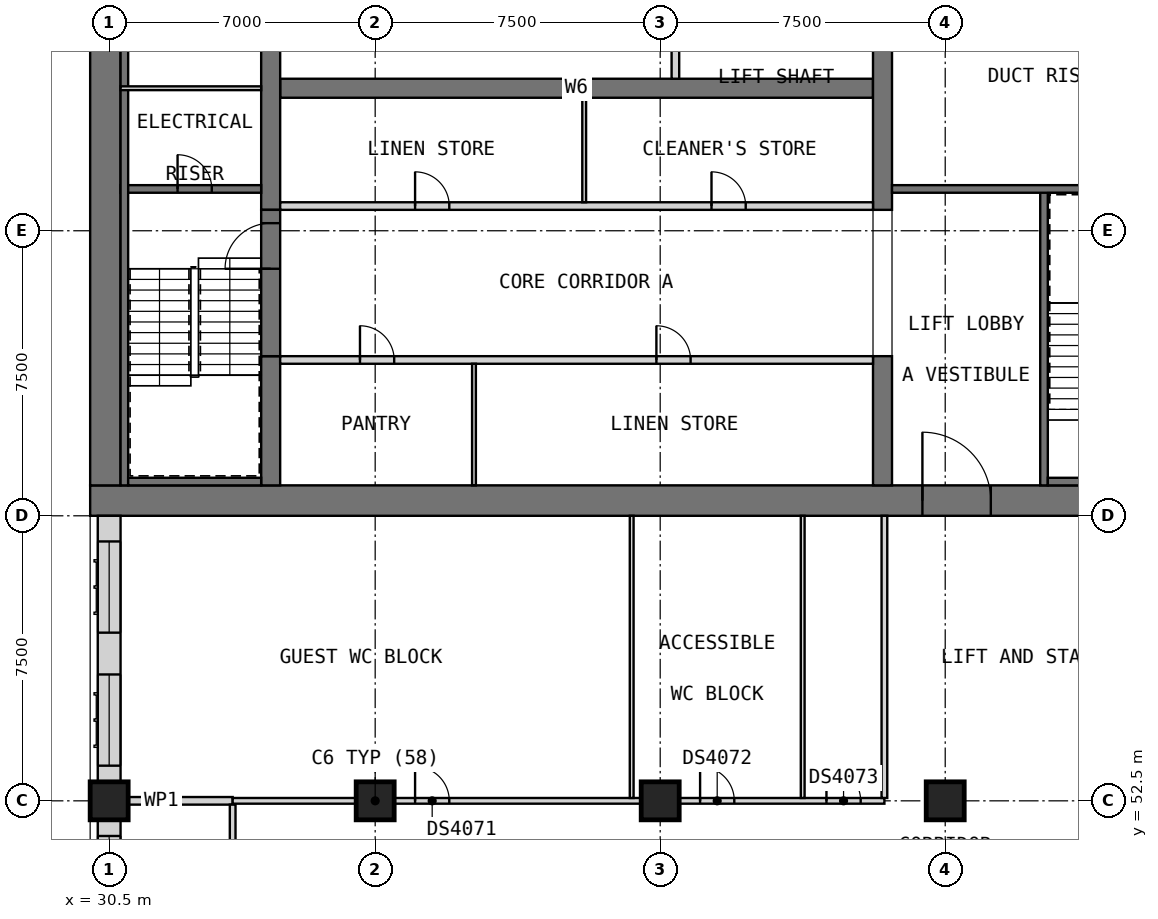
"""IFC4 building model, lengths in metres.
Left out: names, types, materials, properties, quantities, classifications, styles, units other than length and angle.
Written with IfcOpenShell. Run it as: python <this file> out.ifc"""

import sys

from ifc_helpers import new_model, si_unit, direction, frame, frame_2d, origin, origin_2d, place, context, subcontext, project, spatial, rectangle, extrude, element, fill, save


model = new_model("IFC4")
c1 = context("Model", 3, precision=1e-05, world=origin(), true_north=direction((0.0, 1.0)))
c2 = subcontext(c1, "Body", "Model", "MODEL_VIEW")
j1 = project(units=[si_unit("LENGTHUNIT", "METRE"), si_unit("PLANEANGLEUNIT", "RADIAN")], contexts=[c1])
p1 = place(None, origin())
s1 = spatial("IfcSite", under=j1, at=p1, CompositionType="ELEMENT")
p2 = place(p1, origin())
s2 = spatial("IfcBuilding", under=s1, at=p2, CompositionType="ELEMENT")
p3 = place(p2, frame((0.0, 0.0, 141.0)))
s3 = spatial("IfcBuildingStorey", under=s2, at=p3, CompositionType="ELEMENT", Elevation=141.0)
for number, where, z_axis, x_axis in (
    (1, (30.5, 52.5, 0.0), (0.0, 0.0, 1.0), (1.0, 0.0, 0.0)),
    (2, (37.5, 52.5, 0.0), (0.0, 0.0, 1.0), (1.0, 0.0, 0.0)),
    (3, (45.0, 52.5, 0.0), (0.0, 0.0, 1.0), (1.0, 0.0, 0.0)),
    (4, (52.5, 52.5, 0.0), (0.0, 0.0, 1.0), (1.0, 0.0, 0.0)),
):
    element("IfcColumn", number, at=place(p3, frame(where, z_axis=z_axis, x_axis=x_axis)), inside=s3, PredefinedType="COLUMN", context=c2, shape_type="SweptSolid", body=[
        extrude(rectangle(XDim=1.0, YDim=1.0, at=origin_2d()), origin(), (0.0, 0.0, 1.0), 3.6),
    ])
p4 = place(p3, frame((30.0, 60.4, 0.0), z_axis=(0.0, 0.0, 1.0), x_axis=(1.0, 0.0, 0.0)))
e5 = element("IfcWall", 5, at=p4, inside=s3, PredefinedType="SHEAR", context=c2, shape_type="SweptSolid", body=[
    extrude(rectangle(XDim=30.0, YDim=0.8, at=frame_2d((15.0, 0.0))), origin(), (0.0, 0.0, 1.0), 3.6),
])
p5 = place(p4, frame((21.9, 0.0, 0.0)))
e6 = element("IfcOpeningElement", 6, at=p5, cuts=e5, PredefinedType="OPENING", context=c2, shape_type="SweptSolid", body=[
    extrude(rectangle(XDim=1.8, YDim=2.1, at=frame_2d((0.9, 1.05))), frame((0.0, 0.41, 0.0), z_axis=(0.0, -1.0, 0.0), x_axis=(1.0, 0.0, 0.0)), (0.0, 0.0, 1.0), 0.82),
])
p6 = place(p4, frame((26.5, 0.0, 0.0)))
e7 = element("IfcOpeningElement", 7, at=p6, cuts=e5, PredefinedType="OPENING", context=c2, shape_type="SweptSolid", body=[
    extrude(rectangle(XDim=1.2, YDim=2.1, at=frame_2d((0.6, 1.05))), frame((0.0, 0.41, 0.0), z_axis=(0.0, -1.0, 0.0), x_axis=(1.0, 0.0, 0.0)), (0.0, 0.0, 1.0), 0.82),
])
p7 = place(p3, frame((30.4, 60.8, 0.0), z_axis=(0.0, 0.0, 1.0), x_axis=(0.0, 1.0, 0.0)))
e8 = element("IfcWall", 8, at=p7, inside=s3, PredefinedType="SHEAR", context=c2, shape_type="SweptSolid", body=[
    extrude(rectangle(XDim=20.9, YDim=0.8, at=frame_2d((10.45, 0.0))), origin(), (0.0, 0.0, 1.0), 3.6),
])
p8 = place(p3, frame((35.0, 71.25, 0.0), z_axis=(0.0, 0.0, 1.0), x_axis=(1.0, 0.0, 0.0)))
e9 = element("IfcWall", 9, at=p8, inside=s3, PredefinedType="SHEAR", context=c2, shape_type="SweptSolid", body=[
    extrude(rectangle(XDim=15.6, YDim=0.5, at=frame_2d((7.8, 0.0))), origin(), (0.0, 0.0, 1.0), 3.6),
])
p9 = place(p3, frame((34.75, 60.8, 0.0), z_axis=(0.0, 0.0, 1.0), x_axis=(0.0, 1.0, 0.0)))
e10 = element("IfcWall", 10, at=p9, inside=s3, PredefinedType="SHEAR", context=c2, shape_type="SweptSolid", body=[
    extrude(rectangle(XDim=3.4, YDim=0.5, at=frame_2d((1.7, 0.0))), origin(), (0.0, 0.0, 1.0), 3.6),
])
p10 = place(p3, frame((34.75, 68.05, 0.0), z_axis=(0.0, 0.0, 1.0), x_axis=(0.0, 1.0, 0.0)))
e11 = element("IfcWall", 11, at=p10, inside=s3, PredefinedType="SHEAR", context=c2, shape_type="SweptSolid", body=[
    extrude(rectangle(XDim=6.4, YDim=0.5, at=frame_2d((3.2, 0.0))), origin(), (0.0, 0.0, 1.0), 3.6),
])
p11 = place(p3, frame((50.85, 60.8, 0.0), z_axis=(0.0, 0.0, 1.0), x_axis=(0.0, 1.0, 0.0)))
e12 = element("IfcWall", 12, at=p11, inside=s3, PredefinedType="SHEAR", context=c2, shape_type="SweptSolid", body=[
    extrude(rectangle(XDim=3.4, YDim=0.5, at=frame_2d((1.7, 0.0))), origin(), (0.0, 0.0, 1.0), 3.6),
])
p12 = place(p3, frame((50.85, 68.05, 0.0), z_axis=(0.0, 0.0, 1.0), x_axis=(0.0, 1.0, 0.0)))
e13 = element("IfcWall", 13, at=p12, inside=s3, PredefinedType="SHEAR", context=c2, shape_type="SweptSolid", body=[
    extrude(rectangle(XDim=6.4, YDim=0.5, at=frame_2d((3.2, 0.0))), origin(), (0.0, 0.0, 1.0), 3.6),
])
p13 = place(p2, frame((0.0, 0.0, 34.0)))
s4 = spatial("IfcBuildingStorey", under=s2, at=p13, CompositionType="ELEMENT", Elevation=34.0)
for number, where, z_axis, x_axis in (
    (14, (29.7, 61.05, 0.0), (0.0, 0.0, 1.0), (0.0, 1.0, 0.0)),
    (15, (29.7, 65.925, 0.0), (0.0, 0.0, 1.0), (0.0, 1.0, 0.0)),
    (16, (29.7, 70.8, 0.0), (0.0, 0.0, 1.0), (0.0, 1.0, 0.0)),
):
    element("IfcWall", number, at=place(p13, frame(where, z_axis=z_axis, x_axis=x_axis)), inside=s4, PredefinedType="SOLIDWALL", context=c2, shape_type="SweptSolid", body=[
        extrude(rectangle(XDim=0.9, YDim=0.6, at=frame_2d((0.45, 0.0))), origin(), (0.0, 0.0, 1.0), 286.2),
    ])
p14 = place(p3, frame((30.5, 60.0, 0.0), z_axis=(0.0, 0.0, 1.0), x_axis=(0.0, -1.0, 0.0)))
e17 = element("IfcWall", 17, at=p14, inside=s3, PredefinedType="SOLIDWALL", context=c2, shape_type="SweptSolid", body=[
    extrude(rectangle(XDim=7.0, YDim=0.6, at=frame_2d((3.5, 0.0))), origin(), (0.0, 0.0, 1.0), 3.35),
])
p15 = place(p14, frame((4.175, 0.0, 0.8)))
e18 = element("IfcOpeningElement", 18, at=p15, cuts=e17, PredefinedType="OPENING", context=c2, shape_type="SweptSolid", body=[
    extrude(rectangle(XDim=2.4, YDim=1.8, at=frame_2d((1.2, 0.9))), frame((0.0, 0.31, 0.0), z_axis=(0.0, -1.0, 0.0), x_axis=(1.0, 0.0, 0.0)), (0.0, 0.0, 1.0), 0.62),
])
p16 = place(p14, frame((0.675, 0.0, 0.8)))
e19 = element("IfcOpeningElement", 19, at=p16, cuts=e17, PredefinedType="OPENING", context=c2, shape_type="SweptSolid", body=[
    extrude(rectangle(XDim=2.4, YDim=1.8, at=frame_2d((1.2, 0.9))), frame((0.0, 0.31, 0.0), z_axis=(0.0, -1.0, 0.0), x_axis=(1.0, 0.0, 0.0)), (0.0, 0.0, 1.0), 0.62),
])
p17 = place(p3, frame((30.5, 52.0, 0.0), z_axis=(0.0, 0.0, 1.0), x_axis=(0.0, -1.0, 0.0)))
e20 = element("IfcWall", 20, at=p17, inside=s3, PredefinedType="SOLIDWALL", context=c2, shape_type="SweptSolid", body=[
    extrude(rectangle(XDim=6.0, YDim=0.6, at=frame_2d((3.0, 0.0))), origin(), (0.0, 0.0, 1.0), 2.85),
])
p18 = place(p17, frame((3.425, 0.0, 0.8)))
e21 = element("IfcOpeningElement", 21, at=p18, cuts=e20, PredefinedType="OPENING", context=c2, shape_type="SweptSolid", body=[
    extrude(rectangle(XDim=2.4, YDim=1.8, at=frame_2d((1.2, 0.9))), frame((0.0, 0.31, 0.0), z_axis=(0.0, -1.0, 0.0), x_axis=(1.0, 0.0, 0.0)), (0.0, 0.0, 1.0), 0.62),
])
p19 = place(p17, frame((0.425, 0.0, 0.8)))
e22 = element("IfcOpeningElement", 22, at=p19, cuts=e20, PredefinedType="OPENING", context=c2, shape_type="SweptSolid", body=[
    extrude(rectangle(XDim=2.4, YDim=1.8, at=frame_2d((1.2, 0.9))), frame((0.0, 0.31, 0.0), z_axis=(0.0, -1.0, 0.0), x_axis=(1.0, 0.0, 0.0)), (0.0, 0.0, 1.0), 0.62),
])
p20 = place(p3, frame((35.0, 64.1, 0.0), z_axis=(0.0, 0.0, 1.0), x_axis=(1.0, 0.0, 0.0)))
e23 = element("IfcWall", 23, at=p20, inside=s3, PredefinedType="PARTITIONING", context=c2, shape_type="SweptSolid", body=[
    extrude(rectangle(XDim=15.6, YDim=0.2, at=frame_2d((7.8, 0.0))), origin(), (0.0, 0.0, 1.0), 3.35),
])
p21 = place(p20, frame((2.1, 0.0, 0.0)))
e24 = element("IfcOpeningElement", 24, at=p21, cuts=e23, PredefinedType="OPENING", context=c2, shape_type="SweptSolid", body=[
    extrude(rectangle(XDim=0.9, YDim=2.1, at=frame_2d((0.45, 1.05))), frame((0.0, 0.11, 0.0), z_axis=(0.0, -1.0, 0.0), x_axis=(1.0, 0.0, 0.0)), (0.0, 0.0, 1.0), 0.22),
])
p22 = place(p20, frame((9.9, 0.0, 0.0)))
e25 = element("IfcOpeningElement", 25, at=p22, cuts=e23, PredefinedType="OPENING", context=c2, shape_type="SweptSolid", body=[
    extrude(rectangle(XDim=0.9, YDim=2.1, at=frame_2d((0.45, 1.05))), frame((0.0, 0.11, 0.0), z_axis=(0.0, -1.0, 0.0), x_axis=(1.0, 0.0, 0.0)), (0.0, 0.0, 1.0), 0.22),
])
p23 = place(p3, frame((40.1, 60.8, 0.0), z_axis=(0.0, 0.0, 1.0), x_axis=(0.0, 1.0, 0.0)))
e26 = element("IfcWall", 26, at=p23, inside=s3, PredefinedType="PARTITIONING", context=c2, shape_type="SweptSolid", body=[
    extrude(rectangle(XDim=3.2, YDim=0.1, at=frame_2d((1.6, 0.0))), origin(), (0.0, 0.0, 1.0), 3.35),
])
p24 = place(p3, frame((35.0, 68.15, 0.0), z_axis=(0.0, 0.0, 1.0), x_axis=(1.0, 0.0, 0.0)))
e27 = element("IfcWall", 27, at=p24, inside=s3, PredefinedType="PARTITIONING", context=c2, shape_type="SweptSolid", body=[
    extrude(rectangle(XDim=15.6, YDim=0.2, at=frame_2d((7.8, 0.0))), origin(), (0.0, 0.0, 1.0), 3.35),
])
p25 = place(p24, frame((3.55, 0.0, 0.0)))
e28 = element("IfcOpeningElement", 28, at=p25, cuts=e27, PredefinedType="OPENING", context=c2, shape_type="SweptSolid", body=[
    extrude(rectangle(XDim=0.9, YDim=2.1, at=frame_2d((0.45, 1.05))), frame((0.0, 0.11, 0.0), z_axis=(0.0, -1.0, 0.0), x_axis=(1.0, 0.0, 0.0)), (0.0, 0.0, 1.0), 0.22),
])
p26 = place(p24, frame((11.35, 0.0, 0.0)))
e29 = element("IfcOpeningElement", 29, at=p26, cuts=e27, PredefinedType="OPENING", context=c2, shape_type="SweptSolid", body=[
    extrude(rectangle(XDim=0.9, YDim=2.1, at=frame_2d((0.45, 1.05))), frame((0.0, 0.11, 0.0), z_axis=(0.0, -1.0, 0.0), x_axis=(1.0, 0.0, 0.0)), (0.0, 0.0, 1.0), 0.22),
])
p27 = place(p3, frame((43.0, 68.25, 0.0), z_axis=(0.0, 0.0, 1.0), x_axis=(0.0, 1.0, 0.0)))
e30 = element("IfcWall", 30, at=p27, inside=s3, PredefinedType="PARTITIONING", context=c2, shape_type="SweptSolid", body=[
    extrude(rectangle(XDim=2.75, YDim=0.1, at=frame_2d((1.375, 0.0))), origin(), (0.0, 0.0, 1.0), 3.35),
])
p28 = place(p3, frame((45.4, 71.5, 0.0), z_axis=(0.0, 0.0, 1.0), x_axis=(0.0, 1.0, 0.0)))
e31 = element("IfcWall", 31, at=p28, inside=s3, PredefinedType="SOLIDWALL", context=c2, shape_type="SweptSolid", body=[
    extrude(rectangle(XDim=2.0, YDim=0.2, at=frame_2d((1.0, 0.0))), origin(), (0.0, 0.0, 1.0), 3.6),
])
p29 = place(p3, frame((34.75, 64.2, 0.0), z_axis=(0.0, 0.0, 1.0), x_axis=(0.0, 1.0, 0.0)))
e32 = element("IfcWall", 32, at=p29, inside=s3, PredefinedType="SOLIDWALL", context=c2, shape_type="SweptSolid", body=[
    extrude(rectangle(XDim=3.85, YDim=0.5, at=frame_2d((1.925, 0.0))), origin(), (0.0, 0.0, 1.0), 2.4),
])
p30 = place(p29, frame((2.3, 0.0, 0.0)))
e33 = element("IfcOpeningElement", 33, at=p30, cuts=e32, PredefinedType="OPENING", context=c2, shape_type="SweptSolid", body=[
    extrude(rectangle(XDim=1.2, YDim=2.1, at=frame_2d((0.6, 1.05))), frame((0.0, 0.26, 0.0), z_axis=(0.0, -1.0, 0.0), x_axis=(1.0, 0.0, 0.0)), (0.0, 0.0, 1.0), 0.52),
])
p31 = place(p3, frame((30.8, 68.6, 0.0), z_axis=(0.0, 0.0, 1.0), x_axis=(1.0, 0.0, 0.0)))
e34 = element("IfcWall", 34, at=p31, inside=s3, PredefinedType="SOLIDWALL", context=c2, shape_type="SweptSolid", body=[
    extrude(rectangle(XDim=3.7, YDim=0.2, at=frame_2d((1.85, 0.0))), origin(), (0.0, 0.0, 1.0), 3.35),
])
p32 = place(p31, frame((1.5, 0.0, 0.0)))
e35 = element("IfcOpeningElement", 35, at=p32, cuts=e34, PredefinedType="OPENING", context=c2, shape_type="SweptSolid", body=[
    extrude(rectangle(XDim=0.9, YDim=2.1, at=frame_2d((0.45, 1.05))), frame((0.0, 0.11, 0.0), z_axis=(0.0, -1.0, 0.0), x_axis=(1.0, 0.0, 0.0)), (0.0, 0.0, 1.0), 0.22),
])
p33 = place(p3, frame((55.1, 60.8, 0.0), z_axis=(0.0, 0.0, 1.0), x_axis=(0.0, 1.0, 0.0)))
e36 = element("IfcWall", 36, at=p33, inside=s3, PredefinedType="SOLIDWALL", context=c2, shape_type="SweptSolid", body=[
    extrude(rectangle(XDim=7.8, YDim=0.2, at=frame_2d((3.9, 0.0))), origin(), (0.0, 0.0, 1.0), 3.35),
])
p34 = place(p3, frame((51.1, 68.6, 0.0), z_axis=(0.0, 0.0, 1.0), x_axis=(1.0, 0.0, 0.0)))
e37 = element("IfcWall", 37, at=p34, inside=s3, PredefinedType="SOLIDWALL", context=c2, shape_type="SweptSolid", body=[
    extrude(rectangle(XDim=8.1, YDim=0.2, at=frame_2d((4.05, 0.0))), origin(), (0.0, 0.0, 1.0), 3.35),
])
p35 = place(p3, frame((30.9, 60.8, 0.0), z_axis=(0.0, 0.0, 1.0), x_axis=(0.0, 1.0, 0.0)))
e38 = element("IfcWall", 38, at=p35, inside=s3, PredefinedType="SOLIDWALL", context=c2, shape_type="SweptSolid", body=[
    extrude(rectangle(XDim=20.9, YDim=0.2, at=frame_2d((10.45, 0.0))), origin(), (0.0, 0.0, 1.0), 3.35),
])
p36 = place(p3, frame((31.0, 60.9, 0.0), z_axis=(0.0, 0.0, 1.0), x_axis=(1.0, 0.0, 0.0)))
e39 = element("IfcWall", 39, at=p36, inside=s3, PredefinedType="SOLIDWALL", context=c2, shape_type="SweptSolid", body=[
    extrude(rectangle(XDim=3.5, YDim=0.2, at=frame_2d((1.75, 0.0))), origin(), (0.0, 0.0, 1.0), 3.35),
])
p37 = place(p3, frame((55.2, 60.9, 0.0), z_axis=(0.0, 0.0, 1.0), x_axis=(1.0, 0.0, 0.0)))
e40 = element("IfcWall", 40, at=p37, inside=s3, PredefinedType="SOLIDWALL", context=c2, shape_type="SweptSolid", body=[
    extrude(rectangle(XDim=1.3, YDim=0.2, at=frame_2d((0.65, 0.0))), origin(), (0.0, 0.0, 1.0), 3.35),
])
p38 = place(p3, frame((30.8, 71.25, 0.0), z_axis=(0.0, 0.0, 1.0), x_axis=(1.0, 0.0, 0.0)))
e41 = element("IfcWall", 41, at=p38, inside=s3, PredefinedType="PARTITIONING", context=c2, shape_type="SweptSolid", body=[
    extrude(rectangle(XDim=3.7, YDim=0.1, at=frame_2d((1.85, 0.0))), origin(), (0.0, 0.0, 1.0), 3.35),
])
p39 = place(p3, frame((30.0, 52.5, 0.0), z_axis=(0.0, 0.0, 1.0), x_axis=(1.0, 0.0, 0.0)))
e42 = element("IfcWall", 42, at=p39, inside=s3, PredefinedType="PARTITIONING", context=c2, shape_type="SweptSolid", body=[
    extrude(rectangle(XDim=3.75, YDim=0.2, at=frame_2d((1.875, 0.0))), origin(), (0.0, 0.0, 1.0), 3.35),
])
p40 = place(p3, frame((33.75, 52.5, 0.0), z_axis=(0.0, 0.0, 1.0), x_axis=(1.0, 0.0, 0.0)))
e43 = element("IfcWall", 43, at=p40, inside=s3, PredefinedType="PARTITIONING", context=c2, shape_type="SweptSolid", body=[
    extrude(rectangle(XDim=17.15, YDim=0.15, at=frame_2d((8.575, 0.0))), origin(), (0.0, 0.0, 1.0), 3.35),
])
p41 = place(p40, frame((4.8, 0.0, 0.0)))
e44 = element("IfcOpeningElement", 44, at=p41, cuts=e43, PredefinedType="OPENING", context=c2, shape_type="SweptSolid", body=[
    extrude(rectangle(XDim=0.9, YDim=2.1, at=frame_2d((0.45, 1.05))), frame((0.0, 0.085, 0.0), z_axis=(0.0, -1.0, 0.0), x_axis=(1.0, 0.0, 0.0)), (0.0, 0.0, 1.0), 0.17),
])
p42 = place(p40, frame((12.3, 0.0, 0.0)))
e45 = element("IfcOpeningElement", 45, at=p42, cuts=e43, PredefinedType="OPENING", context=c2, shape_type="SweptSolid", body=[
    extrude(rectangle(XDim=0.9, YDim=2.1, at=frame_2d((0.45, 1.05))), frame((0.0, 0.085, 0.0), z_axis=(0.0, -1.0, 0.0), x_axis=(1.0, 0.0, 0.0)), (0.0, 0.0, 1.0), 0.17),
])
p43 = place(p40, frame((15.625, 0.0, 0.0)))
e46 = element("IfcOpeningElement", 46, at=p43, cuts=e43, PredefinedType="OPENING", context=c2, shape_type="SweptSolid", body=[
    extrude(rectangle(XDim=0.9, YDim=2.1, at=frame_2d((0.45, 1.05))), frame((0.0, 0.085, 0.0), z_axis=(0.0, -1.0, 0.0), x_axis=(1.0, 0.0, 0.0)), (0.0, 0.0, 1.0), 0.17),
])
p44 = place(p3, frame((33.75, 50.175, 0.0), z_axis=(0.0, 0.0, 1.0), x_axis=(0.0, 1.0, 0.0)))
e47 = element("IfcWall", 47, at=p44, inside=s3, PredefinedType="PARTITIONING", context=c2, shape_type="SweptSolid", body=[
    extrude(rectangle(XDim=2.225, YDim=0.15, at=frame_2d((1.112, 0.0))), origin(), (0.0, 0.0, 1.0), 3.35),
])
for number, where, z_axis, x_axis in (
    (48, (44.25, 52.575, 0.0), (0.0, 0.0, 1.0), (0.0, 1.0, 0.0)),
    (49, (48.75, 52.575, 0.0), (0.0, 0.0, 1.0), (0.0, 1.0, 0.0)),
):
    element("IfcWall", number, at=place(p3, frame(where, z_axis=z_axis, x_axis=x_axis)), inside=s3, PredefinedType="PARTITIONING", context=c2, shape_type="SweptSolid", body=[
        extrude(rectangle(XDim=7.425, YDim=0.1, at=frame_2d((3.712, 0.0))), origin(), (0.0, 0.0, 1.0), 3.35),
    ])
p45 = place(p3, frame((50.9, 52.575, 0.0), z_axis=(0.0, 0.0, 1.0), x_axis=(0.0, 1.0, 0.0)))
e50 = element("IfcWall", 50, at=p45, inside=s3, PredefinedType="PARTITIONING", context=c2, shape_type="SweptSolid", body=[
    extrude(rectangle(XDim=7.425, YDim=0.15, at=frame_2d((3.712, 0.0))), origin(), (0.0, 0.0, 1.0), 3.35),
])
p46 = place(p15, origin())
e51 = element("IfcWindow", 51, at=p46, inside=s3, PartitioningType="SINGLE_PANEL", PredefinedType="WINDOW", context=c2, shape_type="SweptSolid", body=[
    extrude(rectangle(XDim=2.4, YDim=1.8, at=frame_2d((1.2, 0.9))), frame((0.0, -0.07, 0.0), z_axis=(0.0, -1.0, 0.0), x_axis=(1.0, 0.0, 0.0)), (0.0, 0.0, 1.0), 0.06),
])
fill(e18, e51)
p47 = place(p16, origin())
e52 = element("IfcWindow", 52, at=p47, inside=s3, PartitioningType="SINGLE_PANEL", PredefinedType="WINDOW", context=c2, shape_type="SweptSolid", body=[
    extrude(rectangle(XDim=2.4, YDim=1.8, at=frame_2d((1.2, 0.9))), frame((0.0, -0.07, 0.0), z_axis=(0.0, -1.0, 0.0), x_axis=(1.0, 0.0, 0.0)), (0.0, 0.0, 1.0), 0.06),
])
fill(e19, e52)
p48 = place(p19, origin())
e53 = element("IfcWindow", 53, at=p48, inside=s3, PartitioningType="SINGLE_PANEL", PredefinedType="WINDOW", context=c2, shape_type="SweptSolid", body=[
    extrude(rectangle(XDim=2.4, YDim=1.8, at=frame_2d((1.2, 0.9))), frame((0.0, -0.07, 0.0), z_axis=(0.0, -1.0, 0.0), x_axis=(1.0, 0.0, 0.0)), (0.0, 0.0, 1.0), 0.06),
])
fill(e22, e53)
p49 = place(p21, origin())
e54 = element("IfcDoor", 54, at=p49, inside=s3, OperationType="SINGLE_SWING_RIGHT", PredefinedType="DOOR", context=c2, shape_type="SweptSolid", body=[
    extrude(rectangle(XDim=0.9, YDim=2.1, at=frame_2d((0.45, 1.05))), frame((0.0, 0.025, 0.0), z_axis=(0.0, -1.0, 0.0), x_axis=(1.0, 0.0, 0.0)), (0.0, 0.0, 1.0), 0.05),
])
fill(e24, e54)
p50 = place(p22, origin())
e55 = element("IfcDoor", 55, at=p50, inside=s3, OperationType="SINGLE_SWING_LEFT", PredefinedType="DOOR", context=c2, shape_type="SweptSolid", body=[
    extrude(rectangle(XDim=0.9, YDim=2.1, at=frame_2d((0.45, 1.05))), frame((0.0, 0.025, 0.0), z_axis=(0.0, -1.0, 0.0), x_axis=(1.0, 0.0, 0.0)), (0.0, 0.0, 1.0), 0.05),
])
fill(e25, e55)
p51 = place(p25, origin())
e56 = element("IfcDoor", 56, at=p51, inside=s3, OperationType="SINGLE_SWING_RIGHT", PredefinedType="DOOR", context=c2, shape_type="SweptSolid", body=[
    extrude(rectangle(XDim=0.9, YDim=2.1, at=frame_2d((0.45, 1.05))), frame((0.0, 0.025, 0.0), z_axis=(0.0, -1.0, 0.0), x_axis=(1.0, 0.0, 0.0)), (0.0, 0.0, 1.0), 0.05),
])
fill(e28, e56)
p52 = place(p26, origin())
e57 = element("IfcDoor", 57, at=p52, inside=s3, OperationType="SINGLE_SWING_LEFT", PredefinedType="DOOR", context=c2, shape_type="SweptSolid", body=[
    extrude(rectangle(XDim=0.9, YDim=2.1, at=frame_2d((0.45, 1.05))), frame((0.0, 0.025, 0.0), z_axis=(0.0, -1.0, 0.0), x_axis=(1.0, 0.0, 0.0)), (0.0, 0.0, 1.0), 0.05),
])
fill(e29, e57)
p53 = place(p5, origin())
e58 = element("IfcDoor", 58, at=p53, inside=s3, OperationType="DOUBLE_DOOR_SINGLE_SWING", PredefinedType="DOOR", context=c2, shape_type="SweptSolid", body=[
    extrude(rectangle(XDim=1.8, YDim=2.1, at=frame_2d((0.9, 1.05))), frame((0.0, 0.025, 0.0), z_axis=(0.0, -1.0, 0.0), x_axis=(1.0, 0.0, 0.0)), (0.0, 0.0, 1.0), 0.05),
])
fill(e6, e58)
p54 = place(p30, origin())
e59 = element("IfcDoor", 59, at=p54, inside=s3, OperationType="SINGLE_SWING_LEFT", PredefinedType="DOOR", context=c2, shape_type="SweptSolid", body=[
    extrude(rectangle(XDim=1.2, YDim=2.1, at=frame_2d((0.6, 1.05))), frame((0.0, 0.025, 0.0), z_axis=(0.0, -1.0, 0.0), x_axis=(1.0, 0.0, 0.0)), (0.0, 0.0, 1.0), 0.05),
])
fill(e33, e59)
p55 = place(p32, origin())
e60 = element("IfcDoor", 60, at=p55, inside=s3, OperationType="SINGLE_SWING_LEFT", PredefinedType="DOOR", context=c2, shape_type="SweptSolid", body=[
    extrude(rectangle(XDim=0.9, YDim=2.1, at=frame_2d((0.45, 1.05))), frame((0.0, 0.025, 0.0), z_axis=(0.0, -1.0, 0.0), x_axis=(1.0, 0.0, 0.0)), (0.0, 0.0, 1.0), 0.05),
])
fill(e35, e60)
p56 = place(p41, origin())
e61 = element("IfcDoor", 61, at=p56, inside=s3, OperationType="SINGLE_SWING_LEFT", PredefinedType="DOOR", context=c2, shape_type="SweptSolid", body=[
    extrude(rectangle(XDim=0.9, YDim=2.1, at=frame_2d((0.45, 1.05))), frame((0.0, 0.025, 0.0), z_axis=(0.0, -1.0, 0.0), x_axis=(1.0, 0.0, 0.0)), (0.0, 0.0, 1.0), 0.05),
])
fill(e44, e61)
p57 = place(p42, origin())
e62 = element("IfcDoor", 62, at=p57, inside=s3, OperationType="SINGLE_SWING_LEFT", PredefinedType="DOOR", context=c2, shape_type="SweptSolid", body=[
    extrude(rectangle(XDim=0.9, YDim=2.1, at=frame_2d((0.45, 1.05))), frame((0.0, 0.025, 0.0), z_axis=(0.0, -1.0, 0.0), x_axis=(1.0, 0.0, 0.0)), (0.0, 0.0, 1.0), 0.05),
])
fill(e45, e62)
p58 = place(p43, origin())
e63 = element("IfcDoor", 63, at=p58, inside=s3, OperationType="SINGLE_SWING_LEFT", PredefinedType="DOOR", context=c2, shape_type="SweptSolid", body=[
    extrude(rectangle(XDim=0.9, YDim=2.1, at=frame_2d((0.45, 1.05))), frame((0.0, 0.025, 0.0), z_axis=(0.0, -1.0, 0.0), x_axis=(1.0, 0.0, 0.0)), (0.0, 0.0, 1.0), 0.05),
])
fill(e46, e63)
save(model, sys.argv[1])
